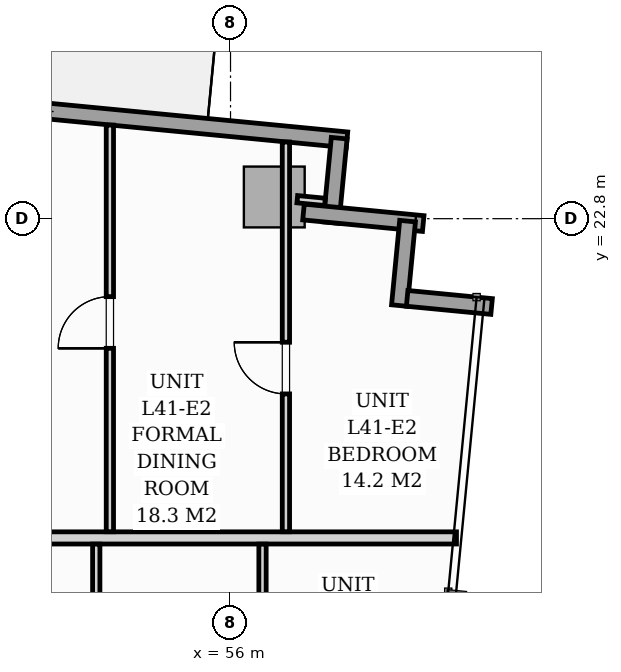
"""IFC4 building model, lengths in metres.
Left out: names, types, materials, properties, quantities, classifications, styles, units other than length and angle.
Written with IfcOpenShell. Run it as: python <this file> out.ifc"""

import sys

from ifc_helpers import new_model, si_unit, direction, frame, frame_2d, origin, origin_2d, place, context, subcontext, project, spatial, rectangle, extrude, source, transform, mapped, element, fill, save


model = new_model("IFC4")
c1 = context("Model", 3, precision=1e-05, world=origin(), true_north=direction((0.0, 1.0)))
c2 = subcontext(c1, "Body", "Model", "MODEL_VIEW")
j1 = project(units=[si_unit("LENGTHUNIT", "METRE"), si_unit("PLANEANGLEUNIT", "RADIAN")], contexts=[c1])
p1 = place(None, origin())
s1 = spatial("IfcSite", under=j1, at=p1, CompositionType="ELEMENT")
p2 = place(p1, origin())
s2 = spatial("IfcBuilding", under=s1, at=p2, CompositionType="ELEMENT")
p3 = place(p2, frame((0.0, 0.0, 143.8)))
s3 = spatial("IfcBuildingStorey", under=s2, at=p3, CompositionType="ELEMENT", Elevation=143.8)
m1 = source(origin(), c2, "Body", "SweptSolid", [
    extrude(rectangle(XDim=1.0, YDim=1.0, at=origin_2d()), origin(), (0.0, 0.0, 1.0), 3.196),
])
p4 = place(p3, frame((56.719, 23.157, 0.002), z_axis=(0.0, 0.0, 1.0), x_axis=(0.995396198367, -0.09584575252, 0.0)))
e1 = element("IfcColumn", 1, at=p4, inside=s3, PredefinedType="COLUMN", context=c2, shape_type="MappedRepresentation", body=[
    mapped(m1, transform((0.0, 0.0, 0.0), scale=1.0)),
])
p5 = place(p3, frame((40.983, 25.727, 0.0), z_axis=(0.0, 0.0, 1.0), x_axis=(0.995395844771, -0.095849424686, 0.0)))
e2 = element("IfcWall", 2, at=p5, inside=s3, PredefinedType="STANDARD", context=c2, shape_type="SweptSolid", body=[
    extrude(rectangle(XDim=17.01, YDim=0.26, at=frame_2d((8.505, 0.0))), origin(), (0.0, 0.0, 1.0), 2.94),
])
p6 = place(p5, frame((9.55, 0.0, 0.0)))
e3 = element("IfcOpeningElement", 3, at=p6, cuts=e2, PredefinedType="OPENING", context=c2, shape_type="SweptSolid", body=[
    extrude(rectangle(XDim=1.8, YDim=2.06, at=frame_2d((0.9, 1.03))), frame((0.0, 0.14, 0.0), z_axis=(0.0, -1.0, 0.0), x_axis=(1.0, 0.0, 0.0)), (0.0, 0.0, 1.0), 0.28),
])
p7 = place(p5, frame((0.7, 0.0, 0.65)))
e4 = element("IfcOpeningElement", 4, at=p7, cuts=e2, PredefinedType="OPENING", context=c2, shape_type="SweptSolid", body=[
    extrude(rectangle(XDim=1.6, YDim=1.5, at=frame_2d((0.8, 0.75))), frame((0.0, 0.14, 0.0), z_axis=(0.0, -1.0, 0.0), x_axis=(1.0, 0.0, 0.0)), (0.0, 0.0, 1.0), 0.28),
])
p8 = place(p3, frame((57.787, 24.124, 0.0), z_axis=(0.0, 0.0, 1.0), x_axis=(-0.095915846097, -0.995389446633, 0.0)))
e5 = element("IfcWall", 5, at=p8, inside=s3, PredefinedType="STANDARD", context=c2, shape_type="SweptSolid", body=[
    extrude(rectangle(XDim=1.395, YDim=0.26, at=frame_2d((0.697, 0.0))), origin(), (0.0, 0.0, 1.0), 2.94),
])
p9 = place(p3, frame((57.2, 22.909, 0.0), z_axis=(0.0, 0.0, 1.0), x_axis=(0.995401789159, -0.095787672171, 0.0)))
e6 = element("IfcWall", 6, at=p9, inside=s3, PredefinedType="STANDARD", context=c2, shape_type="SweptSolid", body=[
    extrude(rectangle(XDim=1.978, YDim=0.26, at=frame_2d((0.989, 0.0))), origin(), (0.0, 0.0, 1.0), 2.94),
])
for number, where, z_axis, x_axis in (
    (7, (58.912, 22.76, 0.0), (0.0, 0.0, 1.0), (-0.096, -0.995, 0.0)),
    (8, (58.905, 21.49, 0.0), (0.0, 0.0, 1.0), (0.995, -0.096, 0.0)),
):
    element("IfcWall", number, at=place(p3, frame(where, z_axis=z_axis, x_axis=x_axis)), inside=s3, PredefinedType="STANDARD", context=c2, shape_type="SweptSolid", body=[
        extrude(rectangle(XDim=1.395, YDim=0.26, at=frame_2d((0.698, 0.0))), origin(), (0.0, 0.0, 1.0), 2.94),
    ])
p10 = place(p3, frame((47.782, 17.55, 0.0), z_axis=(0.0, 0.0, 1.0), x_axis=(1.0, 0.0, 0.0)))
e9 = element("IfcWall", 9, at=p10, inside=s3, PredefinedType="PARTITIONING", context=c2, shape_type="SweptSolid", body=[
    extrude(rectangle(XDim=11.934, YDim=0.2, at=frame_2d((5.967, 0.0))), origin(), (0.0, 0.0, 1.0), 2.94),
])
p11 = place(p3, frame((56.526, 6.189, 0.0), z_axis=(0.0, 0.0, 1.0), x_axis=(0.0, 1.0, 0.0)))
e10 = element("IfcWall", 10, at=p11, inside=s3, PredefinedType="PARTITIONING", context=c2, shape_type="SweptSolid", body=[
    extrude(rectangle(XDim=11.259, YDim=0.12, at=frame_2d((5.629, 0.0))), origin(), (0.0, 0.0, 1.0), 2.94),
])
p12 = place(p11, frame((5.064, 0.0, 0.0)))
e11 = element("IfcOpeningElement", 11, at=p12, cuts=e10, PredefinedType="OPENING", context=c2, shape_type="SweptSolid", body=[
    extrude(rectangle(XDim=0.85, YDim=2.05, at=frame_2d((0.425, 1.025))), frame((0.0, 0.07, 0.0), z_axis=(0.0, -1.0, 0.0), x_axis=(1.0, 0.0, 0.0)), (0.0, 0.0, 1.0), 0.14),
])
p13 = place(p3, frame((53.792, 7.081, 0.0), z_axis=(0.0, 0.0, 1.0), x_axis=(0.0, 1.0, 0.0)))
e12 = element("IfcWall", 12, at=p13, inside=s3, PredefinedType="PARTITIONING", context=c2, shape_type="SweptSolid", body=[
    extrude(rectangle(XDim=10.367, YDim=0.12, at=frame_2d((5.184, 0.0))), origin(), (0.0, 0.0, 1.0), 2.94),
])
p14 = place(p13, frame((4.758, 0.0, 0.0)))
e13 = element("IfcOpeningElement", 13, at=p14, cuts=e12, PredefinedType="OPENING", context=c2, shape_type="SweptSolid", body=[
    extrude(rectangle(XDim=0.85, YDim=2.05, at=frame_2d((0.425, 1.025))), frame((0.0, 0.07, 0.0), z_axis=(0.0, -1.0, 0.0), x_axis=(1.0, 0.0, 0.0)), (0.0, 0.0, 1.0), 0.14),
])
p15 = place(p3, frame((56.911, 17.652, 0.0), z_axis=(0.0, 0.0, 1.0), x_axis=(0.0, 1.0, 0.0)))
e14 = element("IfcWall", 14, at=p15, inside=s3, PredefinedType="PARTITIONING", context=c2, shape_type="SweptSolid", body=[
    extrude(rectangle(XDim=6.408, YDim=0.12, at=frame_2d((3.204, 0.0))), origin(), (0.0, 0.0, 1.0), 2.383),
])
p16 = place(p15, frame((2.266, 0.0, 0.0)))
e15 = element("IfcOpeningElement", 15, at=p16, cuts=e14, PredefinedType="OPENING", context=c2, shape_type="SweptSolid", body=[
    extrude(rectangle(XDim=0.85, YDim=2.05, at=frame_2d((0.425, 1.025))), frame((0.0, 0.07, 0.0), z_axis=(0.0, -1.0, 0.0), x_axis=(1.0, 0.0, 0.0)), (0.0, 0.0, 1.0), 0.14),
])
p17 = place(p3, frame((54.016, 17.652, 0.0), z_axis=(0.0, 0.0, 1.0), x_axis=(0.0, 1.0, 0.0)))
e16 = element("IfcWall", 16, at=p17, inside=s3, PredefinedType="PARTITIONING", context=c2, shape_type="SweptSolid", body=[
    extrude(rectangle(XDim=6.687, YDim=0.12, at=frame_2d((3.344, 0.0))), origin(), (0.0, 0.0, 1.0), 2.94),
])
p18 = place(p17, frame((3.016, 0.0, 0.0)))
e17 = element("IfcOpeningElement", 17, at=p18, cuts=e16, PredefinedType="OPENING", context=c2, shape_type="SweptSolid", body=[
    extrude(rectangle(XDim=0.85, YDim=2.05, at=frame_2d((0.425, 1.025))), frame((0.0, 0.07, 0.0), z_axis=(0.0, -1.0, 0.0), x_axis=(1.0, 0.0, 0.0)), (0.0, 0.0, 1.0), 0.14),
])
p19 = place(p3, frame((57.098, 23.12, 0.0), z_axis=(0.0, 0.0, 1.0), x_axis=(0.995384576284, -0.09596637586, 0.0)))
e18 = element("IfcWall", 18, at=p19, inside=s3, PredefinedType="PARTITIONING", context=c2, shape_type="SweptSolid", body=[
    extrude(rectangle(XDim=0.458, YDim=0.12, at=frame_2d((0.229, 0.0))), origin(), (0.0, 0.0, 1.0), 2.94),
])
m2 = source(origin(), c2, "Body", "SweptSolid", [
    extrude(rectangle(XDim=0.85, YDim=2.05, at=frame_2d((0.425, 1.025))), frame((0.0, 0.025, 0.0), z_axis=(0.0, -1.0, 0.0), x_axis=(1.0, 0.0, 0.0)), (0.0, 0.0, 1.0), 0.05),
])
p20 = place(p16, origin())
e19 = element("IfcDoor", 19, at=p20, inside=s3, OperationType="SINGLE_SWING_RIGHT", PredefinedType="DOOR", context=c2, shape_type="MappedRepresentation", body=[
    mapped(m2, transform((0.0, 0.0, 0.0), scale=1.0)),
])
fill(e15, e19)
p21 = place(p18, origin())
e20 = element("IfcDoor", 20, at=p21, inside=s3, OperationType="SINGLE_SWING_LEFT", PredefinedType="DOOR", context=c2, shape_type="MappedRepresentation", body=[
    mapped(m2, transform((0.0, 0.0, 0.0), scale=1.0)),
])
fill(e17, e20)
save(model, sys.argv[1])
